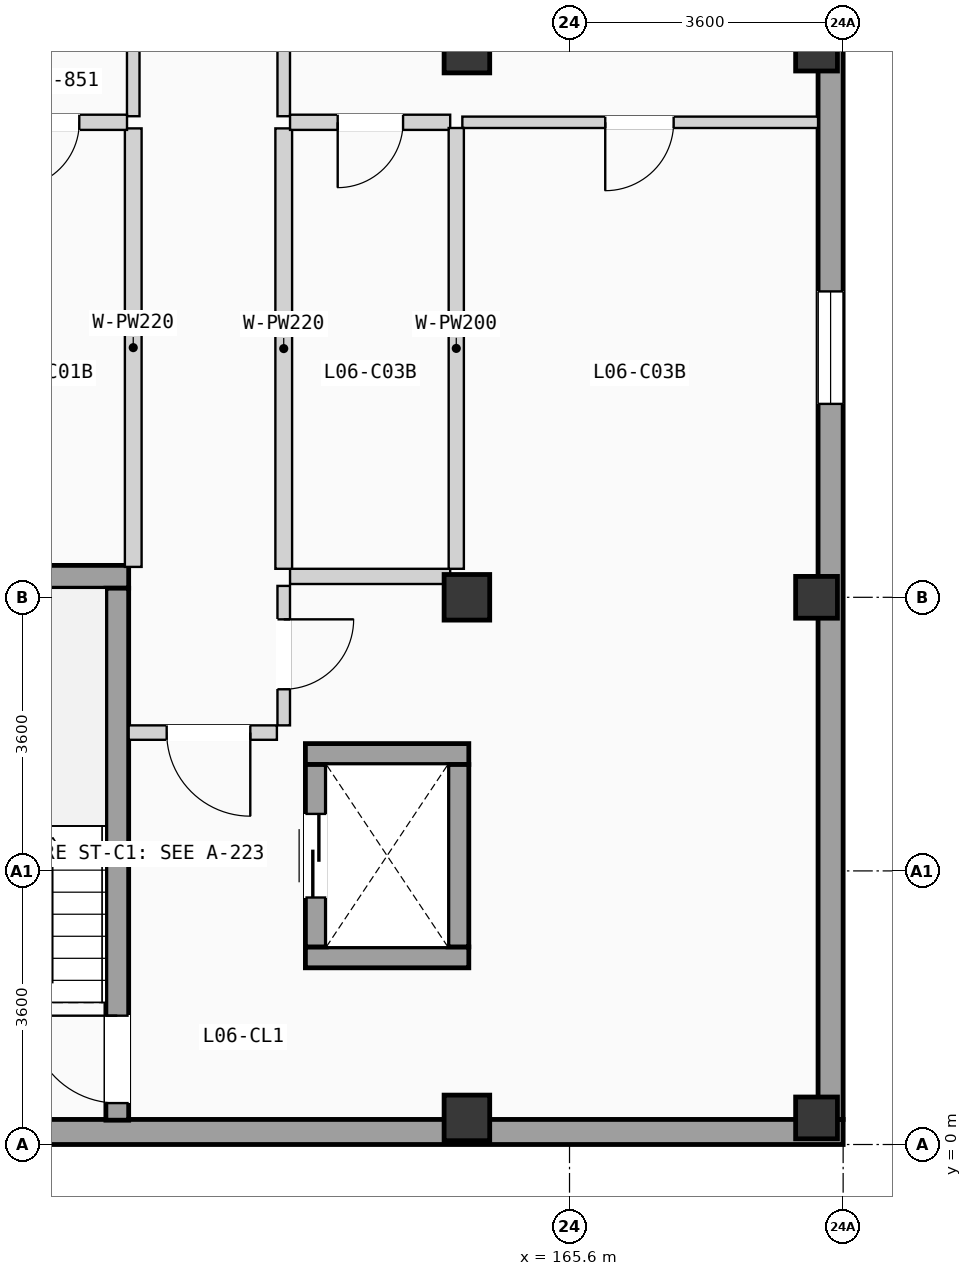
"""IFC4 building model, lengths in metres.
Left out: names, types, materials, properties, quantities, classifications, styles, units other than length and angle.
Written with IfcOpenShell. Run it as: python <this file> out.ifc"""

import sys

from ifc_helpers import new_model, si_unit, direction, frame, frame_2d, origin, origin_2d, place, context, subcontext, project, spatial, rectangle, extrude, element, fill, save


model = new_model("IFC4")
c1 = context("Model", 3, precision=1e-05, world=origin(), true_north=direction((0.0, 1.0)))
c2 = subcontext(c1, "Body", "Model", "MODEL_VIEW")
j1 = project(units=[si_unit("LENGTHUNIT", "METRE"), si_unit("PLANEANGLEUNIT", "RADIAN")], contexts=[c1])
p1 = place(None, origin())
s1 = spatial("IfcSite", under=j1, at=p1, CompositionType="ELEMENT")
p2 = place(p1, origin())
s2 = spatial("IfcBuilding", under=s1, at=p2, CompositionType="ELEMENT")
p3 = place(p2, frame((0.0, 0.0, 21.525)))
s3 = spatial("IfcBuildingStorey", under=s2, at=p3, CompositionType="ELEMENT", Elevation=21.525)
for number, where, z_axis, x_axis in (
    (1, (164.25, 0.35, 0.0), (0.0, 0.0, 1.0), (1.0, 0.0, 0.0)),
    (2, (164.25, 7.2, 0.0), (0.0, 0.0, 1.0), (1.0, 0.0, 0.0)),
    (3, (164.25, 14.4, 0.0), (0.0, 0.0, 1.0), (1.0, 0.0, 0.0)),
):
    element("IfcColumn", number, at=place(p3, frame(where, z_axis=z_axis, x_axis=x_axis)), inside=s3, PredefinedType="COLUMN", context=c2, shape_type="SweptSolid", body=[
        extrude(rectangle(XDim=0.6, YDim=0.6, at=origin_2d()), origin(), (0.0, 0.0, 1.0), 3.15),
    ])
for number, where, z_axis, x_axis in (
    (4, (168.85, 0.35, 0.0), (0.0, 0.0, 1.0), (1.0, 0.0, 0.0)),
    (5, (168.85, 7.2, 0.0), (0.0, 0.0, 1.0), (1.0, 0.0, 0.0)),
    (6, (168.85, 14.4, 0.0), (0.0, 0.0, 1.0), (1.0, 0.0, 0.0)),
):
    element("IfcColumn", number, at=place(p3, frame(where, z_axis=z_axis, x_axis=x_axis)), inside=s3, PredefinedType="COLUMN", context=c2, shape_type="SweptSolid", body=[
        extrude(rectangle(XDim=0.55, YDim=0.55, at=origin_2d()), origin(), (0.0, 0.0, 1.0), 3.15),
    ])
p4 = place(p3, frame((151.2, 0.165, 0.0), z_axis=(0.0, 0.0, 1.0), x_axis=(1.0, 0.0, 0.0)))
e7 = element("IfcWall", 7, at=p4, inside=s3, PredefinedType="SOLIDWALL", context=c2, shape_type="SweptSolid", body=[
    extrude(rectangle(XDim=18.0, YDim=0.33, at=frame_2d((9.0, 0.0))), origin(), (0.0, 0.0, 1.0), 2.89),
])
p5 = place(p3, frame((169.035, 0.33, 0.0), z_axis=(0.0, 0.0, 1.0), x_axis=(0.0, 1.0, 0.0)))
e8 = element("IfcWall", 8, at=p5, inside=s3, PredefinedType="SOLIDWALL", context=c2, shape_type="SweptSolid", body=[
    extrude(rectangle(XDim=49.74, YDim=0.33, at=frame_2d((24.87, 0.0))), origin(), (0.0, 0.0, 1.0), 2.89),
])
p6 = place(p5, frame((16.93, 0.0, 0.705)))
e9 = element("IfcOpeningElement", 9, at=p6, cuts=e8, PredefinedType="OPENING", context=c2, shape_type="SweptSolid", body=[
    extrude(rectangle(XDim=1.48, YDim=1.5, at=frame_2d((0.74, 0.75))), frame((0.0, 0.175, 0.0), z_axis=(0.0, -1.0, 0.0), x_axis=(1.0, 0.0, 0.0)), (0.0, 0.0, 1.0), 0.35),
])
p7 = place(p5, frame((9.415, 0.0, 0.555)))
e10 = element("IfcOpeningElement", 10, at=p7, cuts=e8, PredefinedType="OPENING", context=c2, shape_type="SweptSolid", body=[
    extrude(rectangle(XDim=1.48, YDim=1.65, at=frame_2d((0.74, 0.825))), frame((0.0, 0.175, 0.0), z_axis=(0.0, -1.0, 0.0), x_axis=(1.0, 0.0, 0.0)), (0.0, 0.0, 1.0), 0.35),
])
p8 = place(p5, frame((24.775, 0.0, 0.85)))
e11 = element("IfcOpeningElement", 11, at=p8, cuts=e8, PredefinedType="OPENING", context=c2, shape_type="SweptSolid", body=[
    extrude(rectangle(XDim=0.95, YDim=1.2, at=frame_2d((0.475, 0.6))), frame((0.0, 0.175, 0.0), z_axis=(0.0, -1.0, 0.0), x_axis=(1.0, 0.0, 0.0)), (0.0, 0.0, 1.0), 0.35),
])
p9 = place(p5, frame((33.349, 0.0, 0.9)))
e12 = element("IfcOpeningElement", 12, at=p9, cuts=e8, PredefinedType="OPENING", context=c2, shape_type="SweptSolid", body=[
    extrude(rectangle(XDim=1.6, YDim=1.2, at=frame_2d((0.8, 0.6))), frame((0.0, 0.175, 0.0), z_axis=(0.0, -1.0, 0.0), x_axis=(1.0, 0.0, 0.0)), (0.0, 0.0, 1.0), 0.35),
])
p10 = place(p5, frame((29.939, 0.0, 0.855)))
e13 = element("IfcOpeningElement", 13, at=p10, cuts=e8, PredefinedType="OPENING", context=c2, shape_type="SweptSolid", body=[
    extrude(rectangle(XDim=1.6, YDim=1.35, at=frame_2d((0.8, 0.675))), frame((0.0, 0.175, 0.0), z_axis=(0.0, -1.0, 0.0), x_axis=(1.0, 0.0, 0.0)), (0.0, 0.0, 1.0), 0.35),
])
p11 = place(p5, frame((39.541, 0.0, 0.705)))
e14 = element("IfcOpeningElement", 14, at=p11, cuts=e8, PredefinedType="OPENING", context=c2, shape_type="SweptSolid", body=[
    extrude(rectangle(XDim=1.6, YDim=1.5, at=frame_2d((0.8, 0.75))), frame((0.0, 0.175, 0.0), z_axis=(0.0, -1.0, 0.0), x_axis=(1.0, 0.0, 0.0)), (0.0, 0.0, 1.0), 0.35),
])
p12 = place(p3, frame((156.2, 7.47, 0.0), z_axis=(0.0, 0.0, 1.0), x_axis=(1.0, 0.0, 0.0)))
e15 = element("IfcWall", 15, at=p12, inside=s3, PredefinedType="SHEAR", context=c2, shape_type="SweptSolid", body=[
    extrude(rectangle(XDim=3.6, YDim=0.3, at=frame_2d((1.8, 0.0))), origin(), (0.0, 0.0, 1.0), 2.89),
])
p13 = place(p3, frame((159.65, 0.32, 0.0), z_axis=(0.0, 0.0, 1.0), x_axis=(0.0, 1.0, 0.0)))
e16 = element("IfcWall", 16, at=p13, inside=s3, PredefinedType="SHEAR", context=c2, shape_type="SweptSolid", body=[
    extrude(rectangle(XDim=7.0, YDim=0.3, at=frame_2d((3.5, 0.0))), origin(), (0.0, 0.0, 1.0), 2.89),
])
p14 = place(p13, frame((0.225, 0.0, 0.0)))
e17 = element("IfcOpeningElement", 17, at=p14, cuts=e16, PredefinedType="OPENING", context=c2, shape_type="SweptSolid", body=[
    extrude(rectangle(XDim=1.15, YDim=2.12, at=frame_2d((0.575, 1.06))), frame((0.0, 0.16, 0.0), z_axis=(0.0, -1.0, 0.0), x_axis=(1.0, 0.0, 0.0)), (0.0, 0.0, 1.0), 0.32),
])
for number, where, z_axis, x_axis in (
    (18, (162.125, 2.462, 0.0), (0.0, 0.0, 1.0), (1.0, 0.0, 0.0)),
    (19, (162.125, 5.137, 0.0), (0.0, 0.0, 1.0), (1.0, 0.0, 0.0)),
):
    element("IfcWall", number, at=place(p3, frame(where, z_axis=z_axis, x_axis=x_axis)), inside=s3, PredefinedType="SHEAR", context=c2, shape_type="SweptSolid", body=[
        extrude(rectangle(XDim=2.15, YDim=0.275, at=frame_2d((1.075, 0.0))), origin(), (0.0, 0.0, 1.0), 2.89),
    ])
p15 = place(p3, frame((162.262, 2.6, 0.0), z_axis=(0.0, 0.0, 1.0), x_axis=(0.0, 1.0, 0.0)))
e20 = element("IfcWall", 20, at=p15, inside=s3, PredefinedType="SHEAR", context=c2, shape_type="SweptSolid", body=[
    extrude(rectangle(XDim=2.4, YDim=0.275, at=frame_2d((1.2, 0.0))), origin(), (0.0, 0.0, 1.0), 2.89),
])
p16 = place(p15, frame((0.65, 0.0, 0.0)))
e21 = element("IfcOpeningElement", 21, at=p16, cuts=e20, PredefinedType="OPENING", context=c2, shape_type="SweptSolid", body=[
    extrude(rectangle(XDim=1.1, YDim=2.15, at=frame_2d((0.55, 1.075))), frame((0.0, 0.147, 0.0), z_axis=(0.0, -1.0, 0.0), x_axis=(1.0, 0.0, 0.0)), (0.0, 0.0, 1.0), 0.295),
])
p17 = place(p3, frame((164.137, 2.6, 0.0), z_axis=(0.0, 0.0, 1.0), x_axis=(0.0, 1.0, 0.0)))
e22 = element("IfcWall", 22, at=p17, inside=s3, PredefinedType="SHEAR", context=c2, shape_type="SweptSolid", body=[
    extrude(rectangle(XDim=2.4, YDim=0.275, at=frame_2d((1.2, 0.0))), origin(), (0.0, 0.0, 1.0), 2.89),
])
p18 = place(p3, frame((159.8, 5.42, 0.0), z_axis=(0.0, 0.0, 1.0), x_axis=(1.0, 0.0, 0.0)))
e23 = element("IfcWall", 23, at=p18, inside=s3, PredefinedType="PARTITIONING", context=c2, shape_type="SweptSolid", body=[
    extrude(rectangle(XDim=1.95, YDim=0.19, at=frame_2d((0.975, 0.0))), origin(), (0.0, 0.0, 1.0), 2.87),
])
p19 = place(p18, frame((0.5, 0.0, 0.0)))
e24 = element("IfcOpeningElement", 24, at=p19, cuts=e23, PredefinedType="OPENING", context=c2, shape_type="SweptSolid", body=[
    extrude(rectangle(XDim=1.1, YDim=2.12, at=frame_2d((0.55, 1.06))), frame((0.0, 0.105, 0.0), z_axis=(0.0, -1.0, 0.0), x_axis=(1.0, 0.0, 0.0)), (0.0, 0.0, 1.0), 0.21),
])
p20 = place(p3, frame((161.84, 5.515, 0.0), z_axis=(0.0, 0.0, 1.0), x_axis=(0.0, 1.0, 0.0)))
e25 = element("IfcWall", 25, at=p20, inside=s3, PredefinedType="PARTITIONING", context=c2, shape_type="SweptSolid", body=[
    extrude(rectangle(XDim=1.835, YDim=0.165, at=frame_2d((0.917, 0.0))), origin(), (0.0, 0.0, 1.0), 2.87),
])
p21 = place(p20, frame((0.475, 0.0, 0.0)))
e26 = element("IfcOpeningElement", 26, at=p21, cuts=e25, PredefinedType="OPENING", context=c2, shape_type="SweptSolid", body=[
    extrude(rectangle(XDim=0.92, YDim=2.04, at=frame_2d((0.46, 1.02))), frame((0.0, 0.093, 0.0), z_axis=(0.0, -1.0, 0.0), x_axis=(1.0, 0.0, 0.0)), (0.0, 0.0, 1.0), 0.185),
])
p22 = place(p3, frame((161.923, 7.475, 0.0), z_axis=(0.0, 0.0, 1.0), x_axis=(1.0, 0.0, 0.0)))
e27 = element("IfcWall", 27, at=p22, inside=s3, PredefinedType="PLUMBINGWALL", context=c2, shape_type="SweptSolid", body=[
    extrude(rectangle(XDim=2.107, YDim=0.2, at=frame_2d((1.053, 0.0))), origin(), (0.0, 0.0, 1.0), 2.87),
])
p23 = place(p3, frame((159.86, 13.53, 0.0), z_axis=(0.0, 0.0, 1.0), x_axis=(0.0, 1.0, 0.0)))
e28 = element("IfcWall", 28, at=p23, inside=s3, PredefinedType="PARTITIONING", context=c2, shape_type="SweptSolid", body=[
    extrude(rectangle(XDim=8.984, YDim=0.165, at=frame_2d((4.492, 0.0))), origin(), (0.0, 0.0, 1.0), 2.87),
])
p24 = place(p23, frame((3.967, 0.0, 0.0)))
e29 = element("IfcOpeningElement", 29, at=p24, cuts=e28, PredefinedType="OPENING", context=c2, shape_type="SweptSolid", body=[
    extrude(rectangle(XDim=1.05, YDim=2.13, at=frame_2d((0.525, 1.065))), frame((0.0, 0.093, 0.0), z_axis=(0.0, -1.0, 0.0), x_axis=(1.0, 0.0, 0.0)), (0.0, 0.0, 1.0), 0.185),
])
p25 = place(p3, frame((159.86, 7.6, 0.0), z_axis=(0.0, 0.0, 1.0), x_axis=(0.0, 1.0, 0.0)))
e30 = element("IfcWall", 30, at=p25, inside=s3, PredefinedType="PLUMBINGWALL", context=c2, shape_type="SweptSolid", body=[
    extrude(rectangle(XDim=5.77, YDim=0.22, at=frame_2d((2.885, 0.0))), origin(), (0.0, 0.0, 1.0), 2.87),
])
p26 = place(p3, frame((161.84, 13.53, 0.0), z_axis=(0.0, 0.0, 1.0), x_axis=(0.0, 1.0, 0.0)))
e31 = element("IfcWall", 31, at=p26, inside=s3, PredefinedType="PARTITIONING", context=c2, shape_type="SweptSolid", body=[
    extrude(rectangle(XDim=8.94, YDim=0.165, at=frame_2d((4.47, 0.0))), origin(), (0.0, 0.0, 1.0), 2.87),
])
p27 = place(p26, frame((3.945, 0.0, 0.0)))
e32 = element("IfcOpeningElement", 32, at=p27, cuts=e31, PredefinedType="OPENING", context=c2, shape_type="SweptSolid", body=[
    extrude(rectangle(XDim=1.05, YDim=2.13, at=frame_2d((0.525, 1.065))), frame((0.0, 0.093, 0.0), z_axis=(0.0, -1.0, 0.0), x_axis=(1.0, 0.0, 0.0)), (0.0, 0.0, 1.0), 0.185),
])
p28 = place(p3, frame((161.84, 7.575, 0.0), z_axis=(0.0, 0.0, 1.0), x_axis=(0.0, 1.0, 0.0)))
e33 = element("IfcWall", 33, at=p28, inside=s3, PredefinedType="PLUMBINGWALL", context=c2, shape_type="SweptSolid", body=[
    extrude(rectangle(XDim=5.795, YDim=0.22, at=frame_2d((2.897, 0.0))), origin(), (0.0, 0.0, 1.0), 2.87),
])
p29 = place(p3, frame((157.67, 13.45, 0.0), z_axis=(0.0, 0.0, 1.0), x_axis=(1.0, 0.0, 0.0)))
e34 = element("IfcWall", 34, at=p29, inside=s3, PredefinedType="PLUMBINGWALL", context=c2, shape_type="SweptSolid", body=[
    extrude(rectangle(XDim=2.108, YDim=0.2, at=frame_2d((1.054, 0.0))), origin(), (0.0, 0.0, 1.0), 2.87),
])
p30 = place(p29, frame((0.62, 0.0, 0.0)))
e35 = element("IfcOpeningElement", 35, at=p30, cuts=e34, PredefinedType="OPENING", context=c2, shape_type="SweptSolid", body=[
    extrude(rectangle(XDim=0.86, YDim=2.0, at=frame_2d((0.43, 1.0))), frame((0.0, 0.11, 0.0), z_axis=(0.0, -1.0, 0.0), x_axis=(1.0, 0.0, 0.0)), (0.0, 0.0, 1.0), 0.22),
])
p31 = place(p3, frame((161.923, 13.45, 0.0), z_axis=(0.0, 0.0, 1.0), x_axis=(1.0, 0.0, 0.0)))
e36 = element("IfcWall", 36, at=p31, inside=s3, PredefinedType="PLUMBINGWALL", context=c2, shape_type="SweptSolid", body=[
    extrude(rectangle(XDim=2.107, YDim=0.2, at=frame_2d((1.053, 0.0))), origin(), (0.0, 0.0, 1.0), 2.87),
])
p32 = place(p31, frame((0.627, 0.0, 0.0)))
e37 = element("IfcOpeningElement", 37, at=p32, cuts=e36, PredefinedType="OPENING", context=c2, shape_type="SweptSolid", body=[
    extrude(rectangle(XDim=0.86, YDim=2.0, at=frame_2d((0.43, 1.0))), frame((0.0, 0.11, 0.0), z_axis=(0.0, -1.0, 0.0), x_axis=(1.0, 0.0, 0.0)), (0.0, 0.0, 1.0), 0.22),
])
p33 = place(p3, frame((164.19, 13.45, 0.0), z_axis=(0.0, 0.0, 1.0), x_axis=(1.0, 0.0, 0.0)))
e38 = element("IfcWall", 38, at=p33, inside=s3, PredefinedType="PARTITIONING", context=c2, shape_type="SweptSolid", body=[
    extrude(rectangle(XDim=4.68, YDim=0.15, at=frame_2d((2.34, 0.0))), origin(), (0.0, 0.0, 1.0), 2.87),
])
p34 = place(p33, frame((1.88, 0.0, 0.0)))
e39 = element("IfcOpeningElement", 39, at=p34, cuts=e38, PredefinedType="OPENING", context=c2, shape_type="SweptSolid", body=[
    extrude(rectangle(XDim=0.9, YDim=2.04, at=frame_2d((0.45, 1.02))), frame((0.0, 0.085, 0.0), z_axis=(0.0, -1.0, 0.0), x_axis=(1.0, 0.0, 0.0)), (0.0, 0.0, 1.0), 0.17),
])
p35 = place(p3, frame((164.11, 7.575, 0.0), z_axis=(0.0, 0.0, 1.0), x_axis=(0.0, 1.0, 0.0)))
e40 = element("IfcWall", 40, at=p35, inside=s3, PredefinedType="PLUMBINGWALL", context=c2, shape_type="SweptSolid", body=[
    extrude(rectangle(XDim=5.8, YDim=0.2, at=frame_2d((2.9, 0.0))), origin(), (0.0, 0.0, 1.0), 2.87),
])
p36 = place(p7, origin())
e41 = element("IfcWindow", 41, at=p36, inside=s3, PartitioningType="SINGLE_PANEL", PredefinedType="WINDOW", context=c2, shape_type="SweptSolid", body=[
    extrude(rectangle(XDim=1.48, YDim=1.65, at=frame_2d((0.74, 0.825))), frame((0.0, 0.03, 0.0), z_axis=(0.0, -1.0, 0.0), x_axis=(1.0, 0.0, 0.0)), (0.0, 0.0, 1.0), 0.06),
])
fill(e10, e41)
p37 = place(p14, origin())
e42 = element("IfcDoor", 42, at=p37, inside=s3, OperationType="SINGLE_SWING_RIGHT", PredefinedType="DOOR", context=c2, shape_type="SweptSolid", body=[
    extrude(rectangle(XDim=1.15, YDim=2.12, at=frame_2d((0.575, 1.06))), frame((0.0, 0.025, 0.0), z_axis=(0.0, -1.0, 0.0), x_axis=(1.0, 0.0, 0.0)), (0.0, 0.0, 1.0), 0.05),
])
fill(e17, e42)
p38 = place(p16, origin())
e43 = element("IfcDoor", 43, at=p38, inside=s3, OperationType="SLIDING_TO_LEFT", PredefinedType="DOOR", context=c2, shape_type="SweptSolid", body=[
    extrude(rectangle(XDim=1.1, YDim=2.15, at=frame_2d((0.55, 1.075))), frame((0.0, 0.025, 0.0), z_axis=(0.0, -1.0, 0.0), x_axis=(1.0, 0.0, 0.0)), (0.0, 0.0, 1.0), 0.05),
])
fill(e21, e43)
p39 = place(p19, frame((1.1, 0.0, 0.0), z_axis=(0.0, 0.0, 1.0), x_axis=(-1.0, 0.0, 0.0)))
e44 = element("IfcDoor", 44, at=p39, inside=s3, OperationType="SINGLE_SWING_RIGHT", PredefinedType="DOOR", context=c2, shape_type="SweptSolid", body=[
    extrude(rectangle(XDim=1.1, YDim=2.12, at=frame_2d((0.55, 1.06))), frame((0.0, 0.025, 0.0), z_axis=(0.0, -1.0, 0.0), x_axis=(1.0, 0.0, 0.0)), (0.0, 0.0, 1.0), 0.05),
])
fill(e24, e44)
p40 = place(p21, frame((0.92, 0.0, 0.0), z_axis=(0.0, 0.0, 1.0), x_axis=(-1.0, 0.0, 0.0)))
e45 = element("IfcDoor", 45, at=p40, inside=s3, OperationType="SINGLE_SWING_RIGHT", PredefinedType="DOOR", context=c2, shape_type="SweptSolid", body=[
    extrude(rectangle(XDim=0.92, YDim=2.04, at=frame_2d((0.46, 1.02))), frame((0.0, 0.025, 0.0), z_axis=(0.0, -1.0, 0.0), x_axis=(1.0, 0.0, 0.0)), (0.0, 0.0, 1.0), 0.05),
])
fill(e26, e45)
p41 = place(p30, frame((0.86, 0.0, 0.0), z_axis=(0.0, 0.0, 1.0), x_axis=(-1.0, 0.0, 0.0)))
e46 = element("IfcDoor", 46, at=p41, inside=s3, OperationType="SINGLE_SWING_LEFT", PredefinedType="DOOR", context=c2, shape_type="SweptSolid", body=[
    extrude(rectangle(XDim=0.86, YDim=2.0, at=frame_2d((0.43, 1.0))), frame((0.0, 0.025, 0.0), z_axis=(0.0, -1.0, 0.0), x_axis=(1.0, 0.0, 0.0)), (0.0, 0.0, 1.0), 0.05),
])
fill(e35, e46)
p42 = place(p32, frame((0.86, 0.0, 0.0), z_axis=(0.0, 0.0, 1.0), x_axis=(-1.0, 0.0, 0.0)))
e47 = element("IfcDoor", 47, at=p42, inside=s3, OperationType="SINGLE_SWING_LEFT", PredefinedType="DOOR", context=c2, shape_type="SweptSolid", body=[
    extrude(rectangle(XDim=0.86, YDim=2.0, at=frame_2d((0.43, 1.0))), frame((0.0, 0.025, 0.0), z_axis=(0.0, -1.0, 0.0), x_axis=(1.0, 0.0, 0.0)), (0.0, 0.0, 1.0), 0.05),
])
fill(e37, e47)
p43 = place(p34, frame((0.9, 0.0, 0.0), z_axis=(0.0, 0.0, 1.0), x_axis=(-1.0, 0.0, 0.0)))
e48 = element("IfcDoor", 48, at=p43, inside=s3, OperationType="SINGLE_SWING_LEFT", PredefinedType="DOOR", context=c2, shape_type="SweptSolid", body=[
    extrude(rectangle(XDim=0.9, YDim=2.04, at=frame_2d((0.45, 1.02))), frame((0.0, 0.025, 0.0), z_axis=(0.0, -1.0, 0.0), x_axis=(1.0, 0.0, 0.0)), (0.0, 0.0, 1.0), 0.05),
])
fill(e39, e48)
save(model, sys.argv[1])
